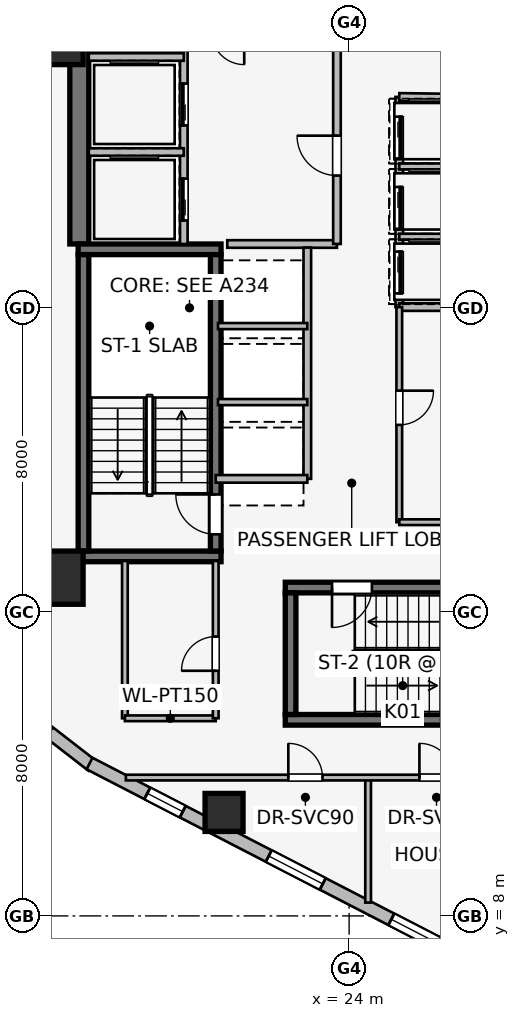
"""IFC4 building model, lengths in metres.
Left out: names, types, materials, properties, quantities, classifications, styles, units other than length and angle.
Written with IfcOpenShell. Run it as: python <this file> out.ifc"""

import sys

from ifc_helpers import new_model, si_unit, direction, frame, frame_2d, origin, origin_2d, place, context, subcontext, project, spatial, rectangle, extrude, element, fill, save


model = new_model("IFC4")
c1 = context("Model", 3, precision=1e-05, world=origin(), true_north=direction((0.0, 1.0)))
c2 = subcontext(c1, "Body", "Model", "MODEL_VIEW")
j1 = project(units=[si_unit("LENGTHUNIT", "METRE"), si_unit("PLANEANGLEUNIT", "RADIAN")], contexts=[c1])
p1 = place(None, origin())
s1 = spatial("IfcSite", under=j1, at=p1, CompositionType="ELEMENT")
p2 = place(p1, origin())
s2 = spatial("IfcBuilding", under=s1, at=p2, CompositionType="ELEMENT")
p3 = place(p2, frame((0.0, 0.0, 122.25)))
s3 = spatial("IfcBuildingStorey", under=s2, at=p3, CompositionType="ELEMENT", Elevation=122.25)
p4 = place(p3, frame((16.9, 25.68, 0.0), z_axis=(0.0, 0.0, 1.0), x_axis=(0.0, 1.0, 0.0)))
e1 = element("IfcWall", 1, at=p4, inside=s3, PredefinedType="SHEAR", context=c2, shape_type="SweptSolid", body=[
    extrude(rectangle(XDim=5.62, YDim=0.5, at=frame_2d((2.81, 0.0))), origin(), (0.0, 0.0, 1.0), 3.45),
])
for number, where, z_axis, x_axis in (
    (2, (16.87, 17.46, 0.0), (0.0, 0.0, 1.0), (1.0, 0.0, 0.0)),
    (3, (20.63, 25.54, 0.0), (0.0, 0.0, 1.0), (-1.0, 0.0, 0.0)),
):
    element("IfcWall", number, at=place(p3, frame(where, z_axis=z_axis, x_axis=x_axis)), inside=s3, PredefinedType="SHEAR", context=c2, shape_type="SweptSolid", body=[
        extrude(rectangle(XDim=3.76, YDim=0.28, at=frame_2d((1.88, 0.0))), origin(), (0.0, 0.0, 1.0), 3.45),
    ])
p5 = place(p3, frame((17.01, 25.4, 0.0), z_axis=(0.0, 0.0, 1.0), x_axis=(0.0, -1.0, 0.0)))
e4 = element("IfcWall", 4, at=p5, inside=s3, PredefinedType="SHEAR", context=c2, shape_type="SweptSolid", body=[
    extrude(rectangle(XDim=7.8, YDim=0.28, at=frame_2d((3.9, 0.0))), origin(), (0.0, 0.0, 1.0), 3.45),
])
p6 = place(p3, frame((20.49, 17.6, 0.0), z_axis=(0.0, 0.0, 1.0), x_axis=(0.0, 1.0, 0.0)))
e5 = element("IfcWall", 5, at=p6, inside=s3, PredefinedType="SHEAR", context=c2, shape_type="SweptSolid", body=[
    extrude(rectangle(XDim=7.8, YDim=0.28, at=frame_2d((3.9, 0.0))), origin(), (0.0, 0.0, 1.0), 3.45),
])
p7 = place(p6, frame((0.44, 0.0, 0.0)))
e6 = element("IfcOpeningElement", 6, at=p7, cuts=e5, PredefinedType="OPENING", context=c2, shape_type="SweptSolid", body=[
    extrude(rectangle(XDim=1.05, YDim=2.0, at=frame_2d((0.525, 1.0))), frame((0.0, 0.15, 0.0), z_axis=(0.0, -1.0, 0.0), x_axis=(1.0, 0.0, 0.0)), (0.0, 0.0, 1.0), 0.3),
])
p8 = place(p3, frame((22.32, 13.16, 0.0), z_axis=(0.0, 0.0, 1.0), x_axis=(1.0, 0.0, 0.0)))
e7 = element("IfcWall", 7, at=p8, inside=s3, PredefinedType="SHEAR", context=c2, shape_type="SweptSolid", body=[
    extrude(rectangle(XDim=8.36, YDim=0.28, at=frame_2d((4.18, 0.0))), origin(), (0.0, 0.0, 1.0), 3.45),
])
p9 = place(p3, frame((30.68, 16.64, 0.0), z_axis=(0.0, 0.0, 1.0), x_axis=(-1.0, 0.0, 0.0)))
e8 = element("IfcWall", 8, at=p9, inside=s3, PredefinedType="SHEAR", context=c2, shape_type="SweptSolid", body=[
    extrude(rectangle(XDim=8.36, YDim=0.28, at=frame_2d((4.18, 0.0))), origin(), (0.0, 0.0, 1.0), 3.45),
])
p10 = place(p9, frame((6.08, 0.0, 0.0)))
e9 = element("IfcOpeningElement", 9, at=p10, cuts=e8, PredefinedType="OPENING", context=c2, shape_type="SweptSolid", body=[
    extrude(rectangle(XDim=1.05, YDim=2.0, at=frame_2d((0.525, 1.0))), frame((0.0, 0.15, 0.0), z_axis=(0.0, -1.0, 0.0), x_axis=(1.0, 0.0, 0.0)), (0.0, 0.0, 1.0), 0.3),
])
p11 = place(p3, frame((22.46, 16.5, 0.0), z_axis=(0.0, 0.0, 1.0), x_axis=(0.0, -1.0, 0.0)))
e10 = element("IfcWall", 10, at=p11, inside=s3, PredefinedType="SHEAR", context=c2, shape_type="SweptSolid", body=[
    extrude(rectangle(XDim=3.2, YDim=0.28, at=frame_2d((1.6, 0.0))), origin(), (0.0, 0.0, 1.0), 3.45),
])
for number, where, z_axis, x_axis in (
    (11, (16.3, 16.9, 0.0), (0.0, 0.0, 1.0), (1.0, 0.0, 0.0)),
    (12, (16.3, 31.1, 0.0), (0.0, 0.0, 1.0), (1.0, 0.0, 0.0)),
):
    element("IfcColumn", number, at=place(p3, frame(where, z_axis=z_axis, x_axis=x_axis)), inside=s3, PredefinedType="COLUMN", context=c2, shape_type="SweptSolid", body=[
        extrude(rectangle(XDim=1.4, YDim=1.4, at=origin_2d()), origin(), (0.0, 0.0, 1.0), 3.45),
    ])
p12 = place(p3, frame((20.709, 10.723, 0.0), z_axis=(0.0, 0.0, 1.0), x_axis=(1.0, 0.0, 0.0)))
e13 = element("IfcColumn", 13, at=p12, inside=s3, PredefinedType="COLUMN", context=c2, shape_type="SweptSolid", body=[
    extrude(rectangle(XDim=1.0, YDim=1.0, at=origin_2d()), origin(), (0.0, 0.0, 1.0), 3.45),
])
p13 = place(p3, frame((17.243, 11.95, 0.0), z_axis=(0.0, 0.0, 1.0), x_axis=(-0.790621329885, 0.612305408053, 0.0)))
e14 = element("IfcWall", 14, at=p13, inside=s3, PredefinedType="STANDARD", context=c2, shape_type="SweptSolid", body=[
    extrude(rectangle(XDim=1.676, YDim=0.33, at=frame_2d((0.838, 0.0))), origin(), (0.0, 0.0, 1.0), 3.19),
])
p14 = place(p3, frame((33.769, 3.442, 0.0), z_axis=(0.0, 0.0, 1.0), x_axis=(-0.888613612362, 0.458656568606, 0.0)))
e15 = element("IfcWall", 15, at=p14, inside=s3, PredefinedType="STANDARD", context=c2, shape_type="SweptSolid", body=[
    extrude(rectangle(XDim=18.681, YDim=0.34, at=frame_2d((9.34, 0.0))), origin(), (0.0, 0.0, 1.0), 3.19),
])
p15 = place(p14, frame((1.75, 0.0, 0.75)))
e16 = element("IfcOpeningElement", 16, at=p15, cuts=e15, PredefinedType="OPENING", context=c2, shape_type="SweptSolid", body=[
    extrude(rectangle(XDim=1.05, YDim=1.4, at=frame_2d((0.525, 0.7))), frame((0.0, 0.18, 0.0), z_axis=(0.0, -1.0, 0.0), x_axis=(1.0, 0.0, 0.0)), (0.0, 0.0, 1.0), 0.36),
])
p16 = place(p14, frame((4.765, 0.0, 0.75)))
e17 = element("IfcOpeningElement", 17, at=p16, cuts=e15, PredefinedType="OPENING", context=c2, shape_type="SweptSolid", body=[
    extrude(rectangle(XDim=2.1, YDim=1.5, at=frame_2d((1.05, 0.75))), frame((0.0, 0.18, 0.0), z_axis=(0.0, -1.0, 0.0), x_axis=(1.0, 0.0, 0.0)), (0.0, 0.0, 1.0), 0.36),
])
p17 = place(p14, frame((7.644, 0.0, 0.75)))
e18 = element("IfcOpeningElement", 18, at=p17, cuts=e15, PredefinedType="OPENING", context=c2, shape_type="SweptSolid", body=[
    extrude(rectangle(XDim=2.1, YDim=1.5, at=frame_2d((1.05, 0.75))), frame((0.0, 0.18, 0.0), z_axis=(0.0, -1.0, 0.0), x_axis=(1.0, 0.0, 0.0)), (0.0, 0.0, 1.0), 0.36),
])
p18 = place(p14, frame((11.774, 0.0, 0.75)))
e19 = element("IfcOpeningElement", 19, at=p18, cuts=e15, PredefinedType="OPENING", context=c2, shape_type="SweptSolid", body=[
    extrude(rectangle(XDim=1.6, YDim=1.55, at=frame_2d((0.8, 0.775))), frame((0.0, 0.18, 0.0), z_axis=(0.0, -1.0, 0.0), x_axis=(1.0, 0.0, 0.0)), (0.0, 0.0, 1.0), 0.36),
])
p19 = place(p14, frame((15.92, 0.0, 0.75)))
e20 = element("IfcOpeningElement", 20, at=p19, cuts=e15, PredefinedType="OPENING", context=c2, shape_type="SweptSolid", body=[
    extrude(rectangle(XDim=1.05, YDim=1.4, at=frame_2d((0.525, 0.7))), frame((0.0, 0.18, 0.0), z_axis=(0.0, -1.0, 0.0), x_axis=(1.0, 0.0, 0.0)), (0.0, 0.0, 1.0), 0.36),
])
p20 = place(p3, frame((19.65, 25.68, 0.0), z_axis=(0.0, 0.0, 1.0), x_axis=(0.0, 1.0, 0.0)))
e21 = element("IfcWall", 21, at=p20, inside=s3, PredefinedType="PARTITIONING", context=c2, shape_type="SweptSolid", body=[
    extrude(rectangle(XDim=5.54, YDim=0.2, at=frame_2d((2.77, 0.0))), origin(), (0.0, 0.0, 1.0), 3.19),
])
p21 = place(p20, frame((0.62, 0.0, 0.0)))
e22 = element("IfcOpeningElement", 22, at=p21, cuts=e21, PredefinedType="OPENING", context=c2, shape_type="SweptSolid", body=[
    extrude(rectangle(XDim=1.1, YDim=2.2, at=frame_2d((0.55, 1.1))), frame((0.0, 0.11, 0.0), z_axis=(0.0, -1.0, 0.0), x_axis=(1.0, 0.0, 0.0)), (0.0, 0.0, 1.0), 0.22),
])
p22 = place(p20, frame((3.12, 0.0, 0.0)))
e23 = element("IfcOpeningElement", 23, at=p22, cuts=e21, PredefinedType="OPENING", context=c2, shape_type="SweptSolid", body=[
    extrude(rectangle(XDim=1.1, YDim=2.2, at=frame_2d((0.55, 1.1))), frame((0.0, 0.11, 0.0), z_axis=(0.0, -1.0, 0.0), x_axis=(1.0, 0.0, 0.0)), (0.0, 0.0, 1.0), 0.22),
])
p23 = place(p3, frame((20.793, 25.68, 0.0), z_axis=(0.0, 0.0, 1.0), x_axis=(1.0, 0.0, 0.0)))
e24 = element("IfcWall", 24, at=p23, inside=s3, PredefinedType="PARTITIONING", context=c2, shape_type="SweptSolid", body=[
    extrude(rectangle(XDim=2.887, YDim=0.2, at=frame_2d((1.443, 0.0))), origin(), (0.0, 0.0, 1.0), 3.19),
])
p24 = place(p3, frame((23.68, 25.68, 0.0), z_axis=(0.0, 0.0, 1.0), x_axis=(0.0, 1.0, 0.0)))
e25 = element("IfcWall", 25, at=p24, inside=s3, PredefinedType="PARTITIONING", context=c2, shape_type="SweptSolid", body=[
    extrude(rectangle(XDim=5.54, YDim=0.2, at=frame_2d((2.77, 0.0))), origin(), (0.0, 0.0, 1.0), 3.19),
])
p25 = place(p24, frame((1.8, 0.0, 0.0)))
e26 = element("IfcOpeningElement", 26, at=p25, cuts=e25, PredefinedType="OPENING", context=c2, shape_type="SweptSolid", body=[
    extrude(rectangle(XDim=1.05, YDim=2.0, at=frame_2d((0.525, 1.0))), frame((0.0, 0.11, 0.0), z_axis=(0.0, -1.0, 0.0), x_axis=(1.0, 0.0, 0.0)), (0.0, 0.0, 1.0), 0.22),
])
p26 = place(p3, frame((17.15, 28.1, 0.0), z_axis=(0.0, 0.0, 1.0), x_axis=(1.0, 0.0, 0.0)))
e27 = element("IfcWall", 27, at=p26, inside=s3, PredefinedType="PARTITIONING", context=c2, shape_type="SweptSolid", body=[
    extrude(rectangle(XDim=2.5, YDim=0.2, at=frame_2d((1.25, 0.0))), origin(), (0.0, 0.0, 1.0), 3.19),
])
p27 = place(p3, frame((19.65, 30.6, 0.0), z_axis=(0.0, 0.0, 1.0), x_axis=(-1.0, 0.0, 0.0)))
e28 = element("IfcWall", 28, at=p27, inside=s3, PredefinedType="PARTITIONING", context=c2, shape_type="SweptSolid", body=[
    extrude(rectangle(XDim=2.5, YDim=0.2, at=frame_2d((1.25, 0.0))), origin(), (0.0, 0.0, 1.0), 2.09),
])
p28 = place(p3, frame((22.9, 19.5, 0.0), z_axis=(0.0, 0.0, 1.0), x_axis=(0.0, 1.0, 0.0)))
e29 = element("IfcWall", 29, at=p28, inside=s3, PredefinedType="PARTITIONING", context=c2, shape_type="SweptSolid", body=[
    extrude(rectangle(XDim=6.085, YDim=0.2, at=frame_2d((3.042, 0.0))), origin(), (0.0, 0.0, 1.0), 3.19),
])
p29 = place(p3, frame((20.49, 19.5, 0.0), z_axis=(0.0, 0.0, 1.0), x_axis=(1.0, 0.0, 0.0)))
e30 = element("IfcWall", 30, at=p29, inside=s3, PredefinedType="PARTITIONING", context=c2, shape_type="SweptSolid", body=[
    extrude(rectangle(XDim=2.41, YDim=0.2, at=frame_2d((1.205, 0.0))), origin(), (0.0, 0.0, 1.0), 2.09),
])
for number, where, z_axis, x_axis in (
    (31, (20.55, 21.52, 0.0), (0.0, 0.0, 1.0), (1.0, 0.0, 0.0)),
    (32, (20.55, 23.52, 0.0), (0.0, 0.0, 1.0), (1.0, 0.0, 0.0)),
):
    element("IfcWall", number, at=place(p3, frame(where, z_axis=z_axis, x_axis=x_axis)), inside=s3, PredefinedType="PARTITIONING", context=c2, shape_type="SweptSolid", body=[
        extrude(rectangle(XDim=2.35, YDim=0.16, at=frame_2d((1.175, 0.0))), origin(), (0.0, 0.0, 1.0), 3.19),
    ])
p30 = place(p3, frame((25.32, 29.55, 0.0), z_axis=(0.0, 0.0, 1.0), x_axis=(0.0, -1.0, 0.0)))
e33 = element("IfcWall", 33, at=p30, inside=s3, PredefinedType="PARTITIONING", context=c2, shape_type="SweptSolid", body=[
    extrude(rectangle(XDim=5.53, YDim=0.2, at=frame_2d((2.765, 0.0))), origin(), (0.0, 0.0, 1.0), 3.19),
])
p31 = place(p30, frame((0.52, 0.0, 0.0)))
e34 = element("IfcOpeningElement", 34, at=p31, cuts=e33, PredefinedType="OPENING", context=c2, shape_type="SweptSolid", body=[
    extrude(rectangle(XDim=1.1, YDim=2.2, at=frame_2d((0.55, 1.1))), frame((0.0, 0.11, 0.0), z_axis=(0.0, -1.0, 0.0), x_axis=(1.0, 0.0, 0.0)), (0.0, 0.0, 1.0), 0.22),
])
p32 = place(p30, frame((2.37, 0.0, 0.0)))
e35 = element("IfcOpeningElement", 35, at=p32, cuts=e33, PredefinedType="OPENING", context=c2, shape_type="SweptSolid", body=[
    extrude(rectangle(XDim=1.1, YDim=2.2, at=frame_2d((0.55, 1.1))), frame((0.0, 0.11, 0.0), z_axis=(0.0, -1.0, 0.0), x_axis=(1.0, 0.0, 0.0)), (0.0, 0.0, 1.0), 0.22),
])
p33 = place(p30, frame((4.07, 0.0, 0.0)))
e36 = element("IfcOpeningElement", 36, at=p33, cuts=e33, PredefinedType="OPENING", context=c2, shape_type="SweptSolid", body=[
    extrude(rectangle(XDim=1.1, YDim=2.2, at=frame_2d((0.55, 1.1))), frame((0.0, 0.11, 0.0), z_axis=(0.0, -1.0, 0.0), x_axis=(1.0, 0.0, 0.0)), (0.0, 0.0, 1.0), 0.22),
])
p34 = place(p3, frame((27.55, 29.52, 0.0), z_axis=(0.0, 0.0, 1.0), x_axis=(-0.999909343457, 0.013464949556, 0.0)))
e37 = element("IfcWall", 37, at=p34, inside=s3, PredefinedType="PARTITIONING", context=c2, shape_type="SweptSolid", body=[
    extrude(rectangle(XDim=2.23, YDim=0.2, at=frame_2d((1.115, 0.0))), origin(), (0.0, 0.0, 1.0), 2.09),
])
p35 = place(p3, frame((25.32, 24.02, 0.0), z_axis=(0.0, 0.0, 1.0), x_axis=(1.0, 0.0, 0.0)))
e38 = element("IfcWall", 38, at=p35, inside=s3, PredefinedType="PARTITIONING", context=c2, shape_type="SweptSolid", body=[
    extrude(rectangle(XDim=2.23, YDim=0.2, at=frame_2d((1.115, 0.0))), origin(), (0.0, 0.0, 1.0), 3.19),
])
for number, where, z_axis, x_axis in (
    (39, (25.32, 25.87, 0.0), (0.0, 0.0, 1.0), (1.0, 0.0, 0.0)),
    (40, (25.32, 27.72, 0.0), (0.0, 0.0, 1.0), (1.0, 0.0, 0.0)),
):
    element("IfcWall", number, at=place(p3, frame(where, z_axis=z_axis, x_axis=x_axis)), inside=s3, PredefinedType="PARTITIONING", context=c2, shape_type="SweptSolid", body=[
        extrude(rectangle(XDim=2.03, YDim=0.16, at=frame_2d((1.015, 0.0))), origin(), (0.0, 0.0, 1.0), 3.19),
    ])
p36 = place(p3, frame((25.32, 24.02, 0.0), z_axis=(0.0, 0.0, 1.0), x_axis=(0.0, -1.0, 0.0)))
e41 = element("IfcWall", 41, at=p36, inside=s3, PredefinedType="PARTITIONING", context=c2, shape_type="SweptSolid", body=[
    extrude(rectangle(XDim=5.66, YDim=0.15, at=frame_2d((2.83, 0.0))), origin(), (0.0, 0.0, 1.0), 3.19),
])
p37 = place(p36, frame((2.2, 0.0, 0.0)))
e42 = element("IfcOpeningElement", 42, at=p37, cuts=e41, PredefinedType="OPENING", context=c2, shape_type="SweptSolid", body=[
    extrude(rectangle(XDim=0.9, YDim=2.0, at=frame_2d((0.45, 1.0))), frame((0.0, 0.085, 0.0), z_axis=(0.0, -1.0, 0.0), x_axis=(1.0, 0.0, 0.0)), (0.0, 0.0, 1.0), 0.17),
])
p38 = place(p3, frame((25.32, 18.36, 0.0), z_axis=(0.0, 0.0, 1.0), x_axis=(1.0, 0.0, 0.0)))
e43 = element("IfcWall", 43, at=p38, inside=s3, PredefinedType="PARTITIONING", context=c2, shape_type="SweptSolid", body=[
    extrude(rectangle(XDim=2.23, YDim=0.15, at=frame_2d((1.115, 0.0))), origin(), (0.0, 0.0, 1.0), 3.19),
])
p39 = place(p3, frame((18.1, 17.34, 0.0), z_axis=(0.0, 0.0, 1.0), x_axis=(0.0, -1.0, 0.0)))
e44 = element("IfcWall", 44, at=p39, inside=s3, PredefinedType="PARTITIONING", context=c2, shape_type="SweptSolid", body=[
    extrude(rectangle(XDim=4.14, YDim=0.15, at=frame_2d((2.07, 0.0))), origin(), (0.0, 0.0, 1.0), 3.19),
])
p40 = place(p3, frame((18.1, 13.2, 0.0), z_axis=(0.0, 0.0, 1.0), x_axis=(1.0, 0.0, 0.0)))
e45 = element("IfcWall", 45, at=p40, inside=s3, PredefinedType="PARTITIONING", context=c2, shape_type="SweptSolid", body=[
    extrude(rectangle(XDim=2.39, YDim=0.15, at=frame_2d((1.195, 0.0))), origin(), (0.0, 0.0, 1.0), 3.19),
])
p41 = place(p3, frame((20.49, 13.2, 0.0), z_axis=(0.0, 0.0, 1.0), x_axis=(0.0, 1.0, 0.0)))
e46 = element("IfcWall", 46, at=p41, inside=s3, PredefinedType="PARTITIONING", context=c2, shape_type="SweptSolid", body=[
    extrude(rectangle(XDim=4.14, YDim=0.15, at=frame_2d((2.07, 0.0))), origin(), (0.0, 0.0, 1.0), 3.19),
])
p42 = place(p41, frame((1.25, 0.0, 0.0)))
e47 = element("IfcOpeningElement", 47, at=p42, cuts=e46, PredefinedType="OPENING", context=c2, shape_type="SweptSolid", body=[
    extrude(rectangle(XDim=0.9, YDim=2.0, at=frame_2d((0.45, 1.0))), frame((0.0, 0.085, 0.0), z_axis=(0.0, -1.0, 0.0), x_axis=(1.0, 0.0, 0.0)), (0.0, 0.0, 1.0), 0.17),
])
p43 = place(p3, frame((24.5, 8.35, 0.0), z_axis=(0.0, 0.0, 1.0), x_axis=(0.0, 1.0, 0.0)))
e48 = element("IfcWall", 48, at=p43, inside=s3, PredefinedType="PARTITIONING", context=c2, shape_type="SweptSolid", body=[
    extrude(rectangle(XDim=3.29, YDim=0.15, at=frame_2d((1.645, 0.0))), origin(), (0.0, 0.0, 1.0), 3.19),
])
p44 = place(p3, frame((18.126, 11.64, 0.0), z_axis=(0.0, 0.0, 1.0), x_axis=(1.0, 0.0, 0.0)))
e49 = element("IfcWall", 49, at=p44, inside=s3, PredefinedType="PARTITIONING", context=c2, shape_type="SweptSolid", body=[
    extrude(rectangle(XDim=14.724, YDim=0.15, at=frame_2d((7.362, 0.0))), origin(), (0.0, 0.0, 1.0), 3.19),
])
p45 = place(p44, frame((4.274, 0.0, 0.0)))
e50 = element("IfcOpeningElement", 50, at=p45, cuts=e49, PredefinedType="OPENING", context=c2, shape_type="SweptSolid", body=[
    extrude(rectangle(XDim=0.9, YDim=2.0, at=frame_2d((0.45, 1.0))), frame((0.0, 0.085, 0.0), z_axis=(0.0, -1.0, 0.0), x_axis=(1.0, 0.0, 0.0)), (0.0, 0.0, 1.0), 0.17),
])
p46 = place(p44, frame((7.724, 0.0, 0.0)))
e51 = element("IfcOpeningElement", 51, at=p46, cuts=e49, PredefinedType="OPENING", context=c2, shape_type="SweptSolid", body=[
    extrude(rectangle(XDim=0.9, YDim=2.0, at=frame_2d((0.45, 1.0))), frame((0.0, 0.085, 0.0), z_axis=(0.0, -1.0, 0.0), x_axis=(1.0, 0.0, 0.0)), (0.0, 0.0, 1.0), 0.17),
])
p47 = place(p17, origin())
e52 = element("IfcWindow", 52, at=p47, inside=s3, PartitioningType="SINGLE_PANEL", PredefinedType="WINDOW", context=c2, shape_type="SweptSolid", body=[
    extrude(rectangle(XDim=2.1, YDim=1.5, at=frame_2d((1.05, 0.75))), frame((0.0, 0.03, 0.0), z_axis=(0.0, -1.0, 0.0), x_axis=(1.0, 0.0, 0.0)), (0.0, 0.0, 1.0), 0.06),
])
fill(e18, e52)
p48 = place(p18, origin())
e53 = element("IfcWindow", 53, at=p48, inside=s3, PartitioningType="SINGLE_PANEL", PredefinedType="WINDOW", context=c2, shape_type="SweptSolid", body=[
    extrude(rectangle(XDim=1.6, YDim=1.55, at=frame_2d((0.8, 0.775))), frame((0.0, 0.03, 0.0), z_axis=(0.0, -1.0, 0.0), x_axis=(1.0, 0.0, 0.0)), (0.0, 0.0, 1.0), 0.06),
])
fill(e19, e53)
p49 = place(p19, origin())
e54 = element("IfcWindow", 54, at=p49, inside=s3, PartitioningType="SINGLE_PANEL", PredefinedType="WINDOW", context=c2, shape_type="SweptSolid", body=[
    extrude(rectangle(XDim=1.05, YDim=1.4, at=frame_2d((0.525, 0.7))), frame((0.0, 0.03, 0.0), z_axis=(0.0, -1.0, 0.0), x_axis=(1.0, 0.0, 0.0)), (0.0, 0.0, 1.0), 0.06),
])
fill(e20, e54)
p50 = place(p7, origin())
e55 = element("IfcDoor", 55, at=p50, inside=s3, OperationType="SINGLE_SWING_RIGHT", PredefinedType="DOOR", context=c2, shape_type="SweptSolid", body=[
    extrude(rectangle(XDim=1.05, YDim=2.0, at=frame_2d((0.525, 1.0))), frame((0.0, 0.025, 0.0), z_axis=(0.0, -1.0, 0.0), x_axis=(1.0, 0.0, 0.0)), (0.0, 0.0, 1.0), 0.05),
])
fill(e6, e55)
p51 = place(p10, origin())
e56 = element("IfcDoor", 56, at=p51, inside=s3, OperationType="SINGLE_SWING_RIGHT", PredefinedType="DOOR", context=c2, shape_type="SweptSolid", body=[
    extrude(rectangle(XDim=1.05, YDim=2.0, at=frame_2d((0.525, 1.0))), frame((0.0, 0.025, 0.0), z_axis=(0.0, -1.0, 0.0), x_axis=(1.0, 0.0, 0.0)), (0.0, 0.0, 1.0), 0.05),
])
fill(e9, e56)
p52 = place(p21, origin())
e57 = element("IfcDoor", 57, at=p52, inside=s3, OperationType="SLIDING_TO_LEFT", PredefinedType="DOOR", context=c2, shape_type="SweptSolid", body=[
    extrude(rectangle(XDim=1.1, YDim=2.2, at=frame_2d((0.55, 1.1))), frame((0.0, 0.025, 0.0), z_axis=(0.0, -1.0, 0.0), x_axis=(1.0, 0.0, 0.0)), (0.0, 0.0, 1.0), 0.05),
])
fill(e22, e57)
p53 = place(p22, origin())
e58 = element("IfcDoor", 58, at=p53, inside=s3, OperationType="SLIDING_TO_LEFT", PredefinedType="DOOR", context=c2, shape_type="SweptSolid", body=[
    extrude(rectangle(XDim=1.1, YDim=2.2, at=frame_2d((0.55, 1.1))), frame((0.0, 0.025, 0.0), z_axis=(0.0, -1.0, 0.0), x_axis=(1.0, 0.0, 0.0)), (0.0, 0.0, 1.0), 0.05),
])
fill(e23, e58)
p54 = place(p25, origin())
e59 = element("IfcDoor", 59, at=p54, inside=s3, OperationType="SINGLE_SWING_RIGHT", PredefinedType="DOOR", context=c2, shape_type="SweptSolid", body=[
    extrude(rectangle(XDim=1.05, YDim=2.0, at=frame_2d((0.525, 1.0))), frame((0.0, 0.025, 0.0), z_axis=(0.0, -1.0, 0.0), x_axis=(1.0, 0.0, 0.0)), (0.0, 0.0, 1.0), 0.05),
])
fill(e26, e59)
p55 = place(p31, origin())
e60 = element("IfcDoor", 60, at=p55, inside=s3, OperationType="SLIDING_TO_LEFT", PredefinedType="DOOR", context=c2, shape_type="SweptSolid", body=[
    extrude(rectangle(XDim=1.1, YDim=2.2, at=frame_2d((0.55, 1.1))), frame((0.0, 0.025, 0.0), z_axis=(0.0, -1.0, 0.0), x_axis=(1.0, 0.0, 0.0)), (0.0, 0.0, 1.0), 0.05),
])
fill(e34, e60)
p56 = place(p32, origin())
e61 = element("IfcDoor", 61, at=p56, inside=s3, OperationType="SLIDING_TO_LEFT", PredefinedType="DOOR", context=c2, shape_type="SweptSolid", body=[
    extrude(rectangle(XDim=1.1, YDim=2.2, at=frame_2d((0.55, 1.1))), frame((0.0, 0.025, 0.0), z_axis=(0.0, -1.0, 0.0), x_axis=(1.0, 0.0, 0.0)), (0.0, 0.0, 1.0), 0.05),
])
fill(e35, e61)
p57 = place(p33, origin())
e62 = element("IfcDoor", 62, at=p57, inside=s3, OperationType="SLIDING_TO_LEFT", PredefinedType="DOOR", context=c2, shape_type="SweptSolid", body=[
    extrude(rectangle(XDim=1.1, YDim=2.2, at=frame_2d((0.55, 1.1))), frame((0.0, 0.025, 0.0), z_axis=(0.0, -1.0, 0.0), x_axis=(1.0, 0.0, 0.0)), (0.0, 0.0, 1.0), 0.05),
])
fill(e36, e62)
p58 = place(p37, origin())
e63 = element("IfcDoor", 63, at=p58, inside=s3, OperationType="SINGLE_SWING_LEFT", PredefinedType="DOOR", context=c2, shape_type="SweptSolid", body=[
    extrude(rectangle(XDim=0.9, YDim=2.0, at=frame_2d((0.45, 1.0))), frame((0.0, 0.025, 0.0), z_axis=(0.0, -1.0, 0.0), x_axis=(1.0, 0.0, 0.0)), (0.0, 0.0, 1.0), 0.05),
])
fill(e42, e63)
p59 = place(p42, origin())
e64 = element("IfcDoor", 64, at=p59, inside=s3, OperationType="SINGLE_SWING_LEFT", PredefinedType="DOOR", context=c2, shape_type="SweptSolid", body=[
    extrude(rectangle(XDim=0.9, YDim=2.0, at=frame_2d((0.45, 1.0))), frame((0.0, 0.025, 0.0), z_axis=(0.0, -1.0, 0.0), x_axis=(1.0, 0.0, 0.0)), (0.0, 0.0, 1.0), 0.05),
])
fill(e47, e64)
p60 = place(p45, origin())
e65 = element("IfcDoor", 65, at=p60, inside=s3, OperationType="SINGLE_SWING_LEFT", PredefinedType="DOOR", context=c2, shape_type="SweptSolid", body=[
    extrude(rectangle(XDim=0.9, YDim=2.0, at=frame_2d((0.45, 1.0))), frame((0.0, 0.025, 0.0), z_axis=(0.0, -1.0, 0.0), x_axis=(1.0, 0.0, 0.0)), (0.0, 0.0, 1.0), 0.05),
])
fill(e50, e65)
p61 = place(p46, origin())
e66 = element("IfcDoor", 66, at=p61, inside=s3, OperationType="SINGLE_SWING_LEFT", PredefinedType="DOOR", context=c2, shape_type="SweptSolid", body=[
    extrude(rectangle(XDim=0.9, YDim=2.0, at=frame_2d((0.45, 1.0))), frame((0.0, 0.025, 0.0), z_axis=(0.0, -1.0, 0.0), x_axis=(1.0, 0.0, 0.0)), (0.0, 0.0, 1.0), 0.05),
])
fill(e51, e66)
save(model, sys.argv[1])
